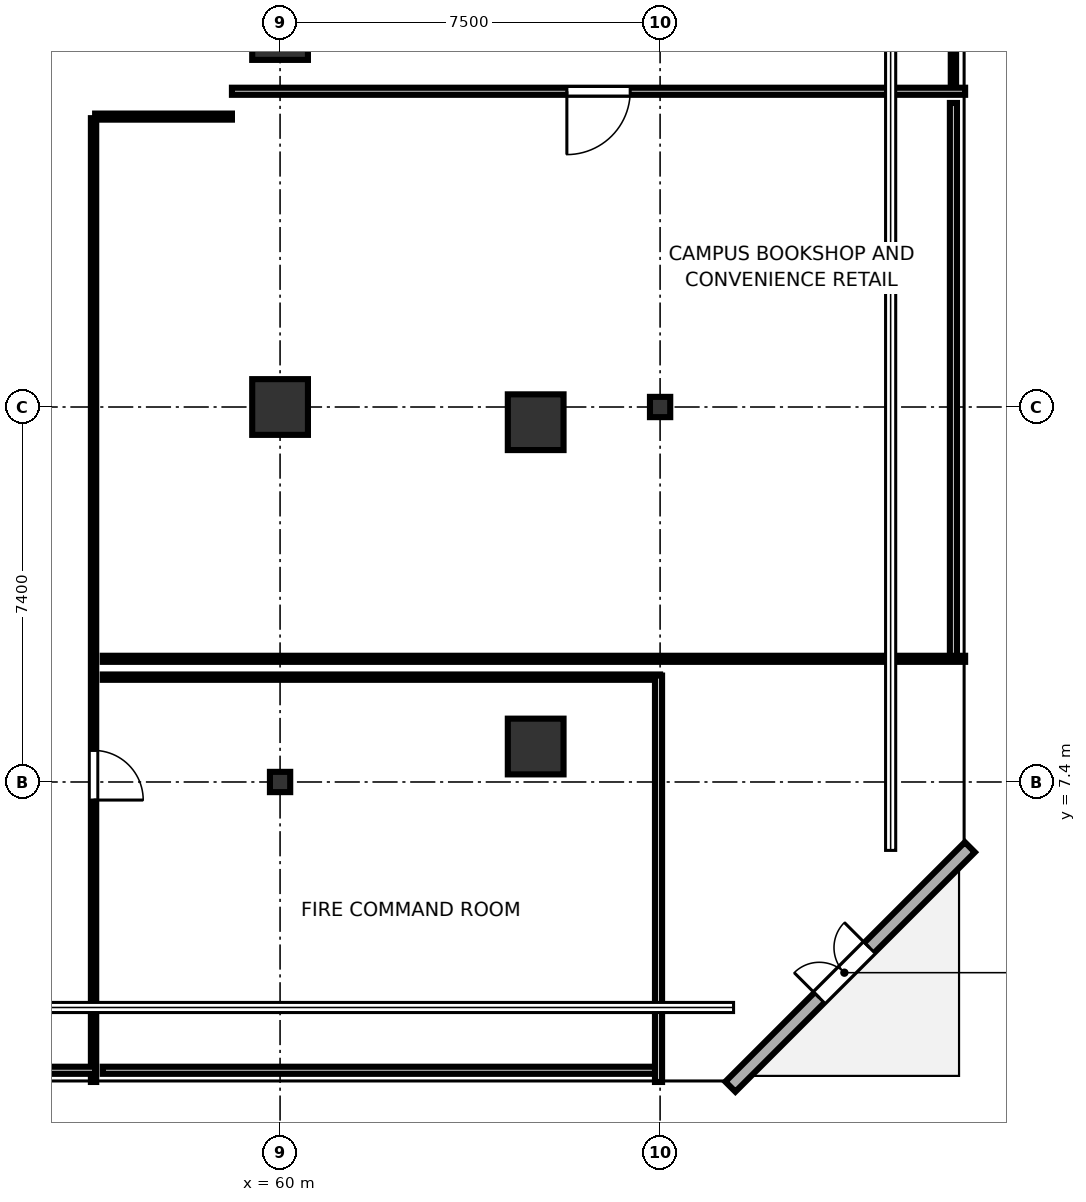
"""IFC4 building model, lengths in metres.
Left out: names, types, materials, properties, quantities, classifications, styles, units other than length and angle.
Written with IfcOpenShell. Run it as: python <this file> out.ifc"""

import sys

from ifc_helpers import new_model, si_unit, direction, frame, frame_2d, origin, origin_2d, place, context, subcontext, project, spatial, rectangle, i_section, extrude, element, fill, save


model = new_model("IFC4")
c1 = context("Model", 3, precision=1e-05, world=origin(), true_north=direction((0.0, 1.0)))
c2 = subcontext(c1, "Body", "Model", "MODEL_VIEW")
j1 = project(units=[si_unit("LENGTHUNIT", "METRE"), si_unit("PLANEANGLEUNIT", "RADIAN")], contexts=[c1])
p1 = place(None, origin())
s1 = spatial("IfcSite", under=j1, at=p1, CompositionType="ELEMENT")
p2 = place(p1, origin())
s2 = spatial("IfcBuilding", under=s1, at=p2, CompositionType="ELEMENT")
p3 = place(p2, origin())
s3 = spatial("IfcBuildingStorey", under=s2, at=p3, CompositionType="ELEMENT", Elevation=0.0)
for number, where, z_axis, x_axis in (
    (1, (65.045, 8.1, 0.0), (0.0, 0.0, 1.0), (1.0, 0.0, 0.0)),
    (2, (65.045, 14.5, 0.0), (0.0, 0.0, 1.0), (1.0, 0.0, 0.0)),
):
    element("IfcColumn", number, at=place(p3, frame(where, z_axis=z_axis, x_axis=x_axis)), inside=s3, PredefinedType="COLUMN", context=c2, shape_type="SweptSolid", body=[
        extrude(rectangle(XDim=1.1, YDim=1.1, at=origin_2d()), origin(), (0.0, 0.0, 1.0), 6.0),
    ])
p4 = place(p3, frame((60.0, 7.4, 0.0), z_axis=(0.0, 0.0, 1.0), x_axis=(1.0, 0.0, 0.0)))
e3 = element("IfcColumn", 3, at=p4, inside=s3, PredefinedType="COLUMN", context=c2, shape_type="SweptSolid", body=[
    extrude(i_section(OverallWidth=0.4, OverallDepth=0.4, WebThickness=0.013, FlangeThickness=0.021, at=origin_2d()), origin(), (0.0, 0.0, 1.0), 6.0),
])
for number, where, z_axis, x_axis in (
    (4, (60.0, 14.8, 0.0), (0.0, 0.0, 1.0), (1.0, 0.0, 0.0)),
    (5, (60.0, 22.2, 0.0), (0.0, 0.0, 1.0), (1.0, 0.0, 0.0)),
):
    element("IfcColumn", number, at=place(p3, frame(where, z_axis=z_axis, x_axis=x_axis)), inside=s3, PredefinedType="COLUMN", context=c2, shape_type="SweptSolid", body=[
        extrude(rectangle(XDim=1.1, YDim=1.1, at=origin_2d()), origin(), (0.0, 0.0, 1.0), 6.0),
    ])
p5 = place(p3, frame((67.5, 14.8, 0.0), z_axis=(0.0, 0.0, 1.0), x_axis=(1.0, 0.0, 0.0)))
e6 = element("IfcColumn", 6, at=p5, inside=s3, PredefinedType="COLUMN", context=c2, shape_type="SweptSolid", body=[
    extrude(i_section(OverallWidth=0.4, OverallDepth=0.4, WebThickness=0.013, FlangeThickness=0.021, at=origin_2d()), origin(), (0.0, 0.0, 1.0), 6.0),
])
p6 = place(p3, frame((68.887, 1.387, 0.0), z_axis=(0.0, 0.0, 1.0), x_axis=(0.707106781187, 0.707106781187, 0.0)))
e7 = element("IfcWall", 7, at=p6, inside=s3, PredefinedType="SOLIDWALL", context=c2, shape_type="SweptSolid", body=[
    extrude(rectangle(XDim=6.684, YDim=0.28, at=frame_2d((3.342, 0.0))), origin(), (0.0, 0.0, 1.0), 5.78),
])
p7 = place(p6, frame((2.482, 0.0, 0.0)))
e8 = element("IfcOpeningElement", 8, at=p7, cuts=e7, PredefinedType="OPENING", context=c2, shape_type="SweptSolid", body=[
    extrude(rectangle(XDim=1.4, YDim=2.2, at=frame_2d((0.7, 1.1))), frame((0.0, 0.15, 0.0), z_axis=(0.0, -1.0, 0.0), x_axis=(1.0, 0.0, 0.0)), (0.0, 0.0, 1.0), 0.3),
])
p8 = place(p3, frame((73.289, 31.0, 0.0), z_axis=(0.0, 0.0, 1.0), x_axis=(0.0, -1.0, 0.0)))
e9 = element("IfcWall", 9, at=p8, inside=s3, PredefinedType="PARTITIONING", context=c2, shape_type="SweptSolid", body=[
    extrude(rectangle(XDim=10.0, YDim=0.105, at=frame_2d((5.0, 0.0))), origin(), (0.0, 0.0, 1.0), 5.1),
])
p9 = place(p3, frame((73.52, 21.031, 0.0), z_axis=(0.0, 0.0, 1.0), x_axis=(-1.0, 0.0, 0.0)))
e10 = element("IfcWall", 10, at=p9, inside=s3, PredefinedType="PARTITIONING", context=c2, shape_type="SweptSolid", body=[
    extrude(rectangle(XDim=14.47, YDim=0.14, at=frame_2d((7.235, 0.0))), origin(), (0.0, 0.0, 1.0), 5.1),
])
p10 = place(p9, frame((6.61, 0.0, 0.0)))
e11 = element("IfcOpeningElement", 11, at=p10, cuts=e10, PredefinedType="OPENING", context=c2, shape_type="SweptSolid", body=[
    extrude(rectangle(XDim=1.25, YDim=2.2, at=frame_2d((0.625, 1.1))), frame((0.0, 0.08, 0.0), z_axis=(0.0, -1.0, 0.0), x_axis=(1.0, 0.0, 0.0)), (0.0, 0.0, 1.0), 0.16),
])
p11 = place(p3, frame((59.05, 20.531, 0.0), z_axis=(0.0, 0.0, 1.0), x_axis=(-1.0, 0.0, 0.0)))
e12 = element("IfcWall", 12, at=p11, inside=s3, PredefinedType="PARTITIONING", context=c2, shape_type="SweptSolid", body=[
    extrude(rectangle(XDim=2.7, YDim=0.12, at=frame_2d((1.35, 0.0))), origin(), (0.0, 0.0, 1.0), 5.1),
])
p12 = place(p3, frame((56.319, 20.5, 0.0), z_axis=(0.0, 0.0, 1.0), x_axis=(0.0, -1.0, 0.0)))
e13 = element("IfcWall", 13, at=p12, inside=s3, PredefinedType="PARTITIONING", context=c2, shape_type="SweptSolid", body=[
    extrude(rectangle(XDim=19.02, YDim=0.105, at=frame_2d((9.51, 0.0))), origin(), (0.0, 0.0, 1.0), 5.1),
])
p13 = place(p12, frame((12.477, 0.0, 0.0)))
e14 = element("IfcOpeningElement", 14, at=p13, cuts=e13, PredefinedType="OPENING", context=c2, shape_type="SweptSolid", body=[
    extrude(rectangle(XDim=0.98, YDim=2.1, at=frame_2d((0.49, 1.05))), frame((0.0, 0.062, 0.0), z_axis=(0.0, -1.0, 0.0), x_axis=(1.0, 0.0, 0.0)), (0.0, 0.0, 1.0), 0.125),
])
p14 = place(p3, frame((56.35, 1.711, 0.0), z_axis=(0.0, 0.0, 1.0), x_axis=(-1.0, 0.0, 0.0)))
e15 = element("IfcWall", 15, at=p14, inside=s3, PredefinedType="PARTITIONING", context=c2, shape_type="SweptSolid", body=[
    extrude(rectangle(XDim=38.7, YDim=0.14, at=frame_2d((19.35, 0.0))), origin(), (0.0, 0.0, 1.0), 5.1),
])
p15 = place(p3, frame((67.5, 1.711, 0.0), z_axis=(0.0, 0.0, 1.0), x_axis=(-1.0, 0.0, 0.0)))
e16 = element("IfcWall", 16, at=p15, inside=s3, PredefinedType="PARTITIONING", context=c2, shape_type="SweptSolid", body=[
    extrude(rectangle(XDim=11.0, YDim=0.14, at=frame_2d((5.5, 0.0))), origin(), (0.0, 0.0, 1.0), 5.1),
])
p16 = place(p3, frame((56.5, 9.469, 0.0), z_axis=(0.0, 0.0, 1.0), x_axis=(1.0, 0.0, 0.0)))
e17 = element("IfcWall", 17, at=p16, inside=s3, PredefinedType="PARTITIONING", context=c2, shape_type="SweptSolid", body=[
    extrude(rectangle(XDim=11.0, YDim=0.105, at=frame_2d((5.5, 0.0))), origin(), (0.0, 0.0, 1.0), 5.1),
])
p17 = place(p3, frame((67.469, 9.5, 0.0), z_axis=(0.0, 0.0, 1.0), x_axis=(0.0, -1.0, 0.0)))
e18 = element("IfcWall", 18, at=p17, inside=s3, PredefinedType="PARTITIONING", context=c2, shape_type="SweptSolid", body=[
    extrude(rectangle(XDim=8.02, YDim=0.14, at=frame_2d((4.01, 0.0))), origin(), (0.0, 0.0, 1.0), 5.1),
])
p18 = place(p3, frame((73.289, 20.8, 0.0), z_axis=(0.0, 0.0, 1.0), x_axis=(0.0, -1.0, 0.0)))
e19 = element("IfcWall", 19, at=p18, inside=s3, PredefinedType="PARTITIONING", context=c2, shape_type="SweptSolid", body=[
    extrude(rectangle(XDim=11.0, YDim=0.14, at=frame_2d((5.5, 0.0))), origin(), (0.0, 0.0, 1.0), 5.1),
])
p19 = place(p3, frame((73.52, 9.831, 0.0), z_axis=(0.0, 0.0, 1.0), x_axis=(-1.0, 0.0, 0.0)))
e20 = element("IfcWall", 20, at=p19, inside=s3, PredefinedType="PARTITIONING", context=c2, shape_type="SweptSolid", body=[
    extrude(rectangle(XDim=17.02, YDim=0.12, at=frame_2d((8.51, 0.0))), origin(), (0.0, 0.0, 1.0), 5.1),
])
p20 = place(p7, origin())
e21 = element("IfcDoor", 21, at=p20, inside=s3, OperationType="DOUBLE_DOOR_SINGLE_SWING", PredefinedType="DOOR", context=c2, shape_type="SweptSolid", body=[
    extrude(rectangle(XDim=1.4, YDim=2.2, at=frame_2d((0.7, 1.1))), frame((0.0, 0.025, 0.0), z_axis=(0.0, -1.0, 0.0), x_axis=(1.0, 0.0, 0.0)), (0.0, 0.0, 1.0), 0.05),
])
fill(e8, e21)
p21 = place(p13, origin())
e22 = element("IfcDoor", 22, at=p21, inside=s3, OperationType="SINGLE_SWING_RIGHT", PredefinedType="DOOR", context=c2, shape_type="SweptSolid", body=[
    extrude(rectangle(XDim=0.98, YDim=2.1, at=frame_2d((0.49, 1.05))), frame((0.0, 0.025, 0.0), z_axis=(0.0, -1.0, 0.0), x_axis=(1.0, 0.0, 0.0)), (0.0, 0.0, 1.0), 0.05),
])
fill(e14, e22)
p22 = place(p10, origin())
e23 = element("IfcDoor", 23, at=p22, inside=s3, OperationType="SINGLE_SWING_RIGHT", PredefinedType="DOOR", context=c2, shape_type="SweptSolid", body=[
    extrude(rectangle(XDim=1.25, YDim=2.2, at=frame_2d((0.625, 1.1))), frame((0.0, 0.025, 0.0), z_axis=(0.0, -1.0, 0.0), x_axis=(1.0, 0.0, 0.0)), (0.0, 0.0, 1.0), 0.05),
])
fill(e11, e23)
save(model, sys.argv[1])
